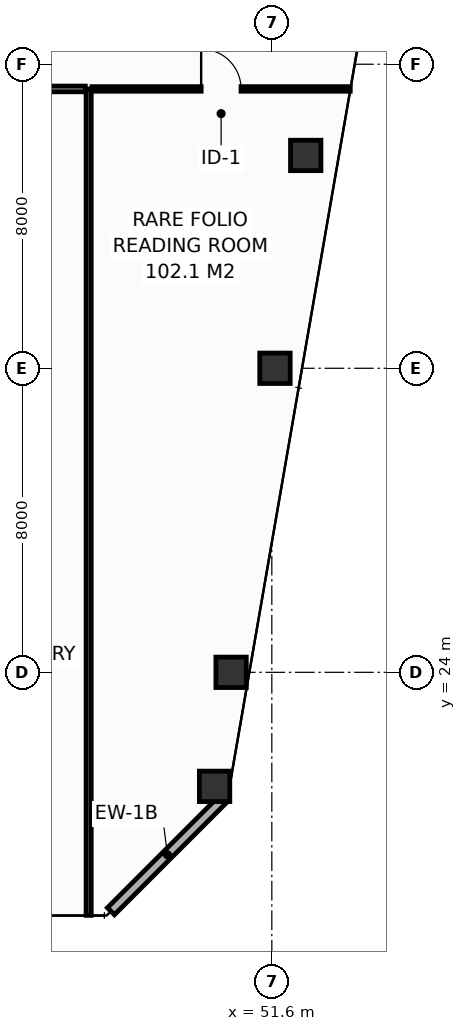
"""IFC4 building model, lengths in metres.
Left out: names, types, materials, properties, quantities, classifications, styles, units other than length and angle.
Written with IfcOpenShell. Run it as: python <this file> out.ifc"""

import sys

from ifc_helpers import new_model, si_unit, direction, frame, frame_2d, origin, origin_2d, place, context, subcontext, project, spatial, rectangle, hollow_rectangle, extrude, element, fill, save


model = new_model("IFC4")
c1 = context("Model", 3, precision=1e-05, world=origin(), true_north=direction((0.0, 1.0)))
c2 = subcontext(c1, "Body", "Model", "MODEL_VIEW")
j1 = project(units=[si_unit("LENGTHUNIT", "METRE"), si_unit("PLANEANGLEUNIT", "RADIAN")], contexts=[c1])
p1 = place(None, origin())
s1 = spatial("IfcSite", under=j1, at=p1, CompositionType="ELEMENT")
p2 = place(p1, origin())
s2 = spatial("IfcBuilding", under=s1, at=p2, CompositionType="ELEMENT")
p3 = place(p2, frame((0.0, 0.0, 249.6)))
s3 = spatial("IfcBuildingStorey", under=s2, at=p3, CompositionType="ELEMENT", Elevation=249.6)
for number, where, z_axis, x_axis in (
    (1, (50.094, 21.0, 0.0), (0.0, 0.0, 1.0), (1.0, 0.0, 0.0)),
    (2, (50.528, 24.0, 0.0), (0.0, 0.0, 1.0), (1.0, 0.0, 0.0)),
    (3, (51.683, 32.0, 0.0), (0.0, 0.0, 1.0), (1.0, 0.0, 0.0)),
    (4, (52.492, 37.6, 0.0), (0.0, 0.0, 1.0), (1.0, 0.0, 0.0)),
):
    element("IfcColumn", number, at=place(p3, frame(where, z_axis=z_axis, x_axis=x_axis)), inside=s3, PredefinedType="COLUMN", context=c2, shape_type="SweptSolid", body=[
        extrude(hollow_rectangle(XDim=0.8, YDim=0.8, WallThickness=0.036, at=origin_2d()), origin(), (0.0, 0.0, 1.0), 3.8),
    ])
p4 = place(p3, frame((47.366, 17.713, 0.0), z_axis=(0.0, 0.0, 1.0), x_axis=(0.70707775441, 0.707135806771, 0.0)))
e5 = element("IfcWall", 5, at=p4, inside=s3, PredefinedType="STANDARD", context=c2, shape_type="SweptSolid", body=[
    extrude(rectangle(XDim=4.206, YDim=0.26, at=frame_2d((2.103, 0.0))), origin(), (0.0, 0.0, 1.0), 3.35),
])
p5 = place(p3, frame((46.78, 17.605, 0.0), z_axis=(0.0, 0.0, 1.0), x_axis=(0.0, 1.0, 0.0)))
e6 = element("IfcWall", 6, at=p5, inside=s3, PredefinedType="PARTITIONING", context=c2, shape_type="SweptSolid", body=[
    extrude(rectangle(XDim=21.745, YDim=0.135, at=frame_2d((10.873, 0.0))), origin(), (0.0, 0.0, 1.0), 1.535),
])
p6 = place(p3, frame((41.127, 39.35, 0.0), z_axis=(0.0, 0.0, 1.0), x_axis=(1.0, 0.0, 0.0)))
e7 = element("IfcWall", 7, at=p6, inside=s3, PredefinedType="PARTITIONING", context=c2, shape_type="SweptSolid", body=[
    extrude(rectangle(XDim=5.565, YDim=0.15, at=frame_2d((2.782, 0.0))), origin(), (0.0, 0.0, 1.0), 3.35),
])
p7 = place(p6, frame((2.258, 0.0, 0.0)))
e8 = element("IfcOpeningElement", 8, at=p7, cuts=e7, PredefinedType="OPENING", context=c2, shape_type="SweptSolid", body=[
    extrude(rectangle(XDim=1.05, YDim=2.15, at=frame_2d((0.525, 1.075))), frame((0.0, 0.085, 0.0), z_axis=(0.0, -1.0, 0.0), x_axis=(1.0, 0.0, 0.0)), (0.0, 0.0, 1.0), 0.17),
])
p8 = place(p3, frame((46.867, 39.35, 0.0), z_axis=(0.0, 0.0, 1.0), x_axis=(1.0, 0.0, 0.0)))
e9 = element("IfcWall", 9, at=p8, inside=s3, PredefinedType="PARTITIONING", context=c2, shape_type="SweptSolid", body=[
    extrude(rectangle(XDim=6.796, YDim=0.12, at=frame_2d((3.398, 0.0))), origin(), (0.0, 0.0, 1.0), 2.885),
])
p9 = place(p8, frame((2.873, 0.0, 0.0)))
e10 = element("IfcOpeningElement", 10, at=p9, cuts=e9, PredefinedType="OPENING", context=c2, shape_type="SweptSolid", body=[
    extrude(rectangle(XDim=1.05, YDim=2.15, at=frame_2d((0.525, 1.075))), frame((0.0, 0.07, 0.0), z_axis=(0.0, -1.0, 0.0), x_axis=(1.0, 0.0, 0.0)), (0.0, 0.0, 1.0), 0.14),
])
p10 = place(p9, origin())
e11 = element("IfcDoor", 11, at=p10, inside=s3, OperationType="SINGLE_SWING_LEFT", PredefinedType="DOOR", context=c2, shape_type="SweptSolid", body=[
    extrude(rectangle(XDim=1.05, YDim=2.15, at=frame_2d((0.525, 1.075))), frame((0.0, 0.025, 0.0), z_axis=(0.0, -1.0, 0.0), x_axis=(1.0, 0.0, 0.0)), (0.0, 0.0, 1.0), 0.05),
])
fill(e10, e11)
save(model, sys.argv[1])
